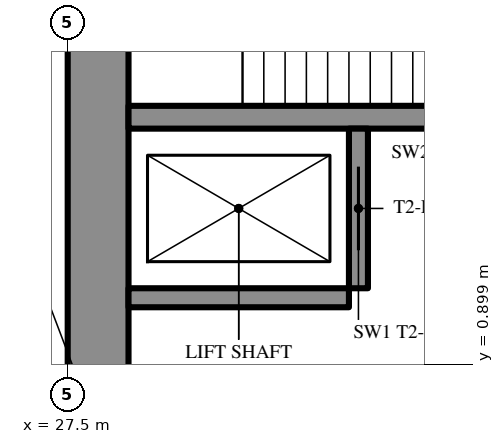
"""IFC4 building model, lengths in metres.
Left out: names, types, materials, properties, quantities, classifications, styles, units other than length and angle.
Written with IfcOpenShell. Run it as: python <this file> out.ifc"""

import sys

from ifc_helpers import new_model, si_unit, direction, frame, frame_2d, origin, place, context, subcontext, project, spatial, rectangle, extrude, element, fill, save


model = new_model("IFC4")
c1 = context("Model", 3, precision=1e-05, world=origin(), true_north=direction((0.0, 1.0)))
c2 = subcontext(c1, "Body", "Model", "MODEL_VIEW")
j1 = project(units=[si_unit("LENGTHUNIT", "METRE"), si_unit("PLANEANGLEUNIT", "RADIAN")], contexts=[c1])
p1 = place(None, origin())
s1 = spatial("IfcSite", under=j1, at=p1, CompositionType="ELEMENT")
p2 = place(p1, origin())
s2 = spatial("IfcBuilding", under=s1, at=p2, CompositionType="ELEMENT")
p3 = place(p2, origin())
s3 = spatial("IfcBuildingStorey", under=s2, at=p3, CompositionType="ELEMENT", Elevation=0.0)
p4 = place(p3, frame((27.9, -8.6, 0.0), z_axis=(0.0, 0.0, 1.0), x_axis=(0.0, 1.0, 0.0)))
e1 = element("IfcWall", 1, at=p4, inside=s3, PredefinedType="SHEAR", context=c2, shape_type="SweptSolid", body=[
    extrude(rectangle(XDim=17.2, YDim=0.8, at=frame_2d((8.6, 0.0))), origin(), (0.0, 0.0, 1.0), 7.2),
])
p5 = place(p3, frame((28.3, 4.15, 0.0), z_axis=(0.0, 0.0, 1.0), x_axis=(1.0, 0.0, 0.0)))
e2 = element("IfcWall", 2, at=p5, inside=s3, PredefinedType="SHEAR", context=c2, shape_type="SweptSolid", body=[
    extrude(rectangle(XDim=8.4, YDim=0.3, at=frame_2d((4.2, 0.0))), origin(), (0.0, 0.0, 1.0), 7.2),
])
p6 = place(p3, frame((31.325, 1.9, 0.0), z_axis=(0.0, 0.0, 1.0), x_axis=(0.0, 1.0, 0.0)))
e3 = element("IfcWall", 3, at=p6, inside=s3, PredefinedType="SHEAR", context=c2, shape_type="SweptSolid", body=[
    extrude(rectangle(XDim=2.1, YDim=0.25, at=frame_2d((1.05, 0.0))), origin(), (0.0, 0.0, 1.0), 7.2),
])
p7 = place(p6, frame((0.5, 0.0, 0.0)))
e4 = element("IfcOpeningElement", 4, at=p7, cuts=e3, PredefinedType="OPENING", context=c2, shape_type="SweptSolid", body=[
    extrude(rectangle(XDim=1.1, YDim=2.2, at=frame_2d((0.55, 1.1))), frame((0.0, 0.135, 0.0), z_axis=(0.0, -1.0, 0.0), x_axis=(1.0, 0.0, 0.0)), (0.0, 0.0, 1.0), 0.27),
])
p8 = place(p3, frame((28.3, 1.775, 0.0), z_axis=(0.0, 0.0, 1.0), x_axis=(1.0, 0.0, 0.0)))
e5 = element("IfcWall", 5, at=p8, inside=s3, PredefinedType="SHEAR", context=c2, shape_type="SweptSolid", body=[
    extrude(rectangle(XDim=2.9, YDim=0.25, at=frame_2d((1.45, 0.0))), origin(), (0.0, 0.0, 1.0), 7.2),
])
p9 = place(p3, frame((27.2, -13.8, 0.0), z_axis=(0.0, 0.0, 1.0), x_axis=(0.866027159892, 0.499996958321, 0.0)))
e6 = element("IfcWall", 6, at=p9, inside=s3, PredefinedType="SHEAR", context=c2, shape_type="SweptSolid", body=[
    extrude(rectangle(XDim=27.947, YDim=2.0, at=frame_2d((13.973, 0.0))), origin(), (0.0, 0.0, 1.0), 7.2),
])
p10 = place(p9, frame((4.6, 0.0, 0.0)))
e7 = element("IfcOpeningElement", 7, at=p10, cuts=e6, PredefinedType="OPENING", context=c2, shape_type="SweptSolid", body=[
    extrude(rectangle(XDim=1.0, YDim=2.2, at=frame_2d((0.5, 1.1))), frame((0.0, 1.01, 0.0), z_axis=(0.0, -1.0, 0.0), x_axis=(1.0, 0.0, 0.0)), (0.0, 0.0, 1.0), 2.02),
])
p11 = place(p9, frame((13.395, 0.0, 0.0)))
e8 = element("IfcOpeningElement", 8, at=p11, cuts=e6, PredefinedType="OPENING", context=c2, shape_type="SweptSolid", body=[
    extrude(rectangle(XDim=1.8, YDim=2.2, at=frame_2d((0.9, 1.1))), frame((0.0, 1.01, 0.0), z_axis=(0.0, -1.0, 0.0), x_axis=(1.0, 0.0, 0.0)), (0.0, 0.0, 1.0), 2.02),
])
p12 = place(p3, frame((27.2, 13.8, 0.0), z_axis=(0.0, 0.0, 1.0), x_axis=(0.866024545924, -0.500001485854, 0.0)))
e9 = element("IfcWall", 9, at=p12, inside=s3, PredefinedType="SHEAR", context=c2, shape_type="SweptSolid", body=[
    extrude(rectangle(XDim=26.534, YDim=2.0, at=frame_2d((13.267, 0.0))), origin(), (0.0, 0.0, 1.0), 7.2),
])
p13 = place(p12, frame((4.6, 0.0, 0.0)))
e10 = element("IfcOpeningElement", 10, at=p13, cuts=e9, PredefinedType="OPENING", context=c2, shape_type="SweptSolid", body=[
    extrude(rectangle(XDim=1.0, YDim=2.2, at=frame_2d((0.5, 1.1))), frame((0.0, 1.01, 0.0), z_axis=(0.0, -1.0, 0.0), x_axis=(1.0, 0.0, 0.0)), (0.0, 0.0, 1.0), 2.02),
])
p14 = place(p12, frame((13.395, 0.0, 0.0)))
e11 = element("IfcOpeningElement", 11, at=p14, cuts=e9, PredefinedType="OPENING", context=c2, shape_type="SweptSolid", body=[
    extrude(rectangle(XDim=1.8, YDim=2.2, at=frame_2d((0.9, 1.1))), frame((0.0, 1.01, 0.0), z_axis=(0.0, -1.0, 0.0), x_axis=(1.0, 0.0, 0.0)), (0.0, 0.0, 1.0), 2.02),
])
p15 = place(p7, origin())
e12 = element("IfcDoor", 12, at=p15, inside=s3, OperationType="SLIDING_TO_LEFT", PredefinedType="USERDEFINED", context=c2, shape_type="SweptSolid", body=[
    extrude(rectangle(XDim=1.1, YDim=2.2, at=frame_2d((0.55, 1.1))), frame((0.0, 0.025, 0.0), z_axis=(0.0, -1.0, 0.0), x_axis=(1.0, 0.0, 0.0)), (0.0, 0.0, 1.0), 0.05),
])
fill(e4, e12)
save(model, sys.argv[1])
